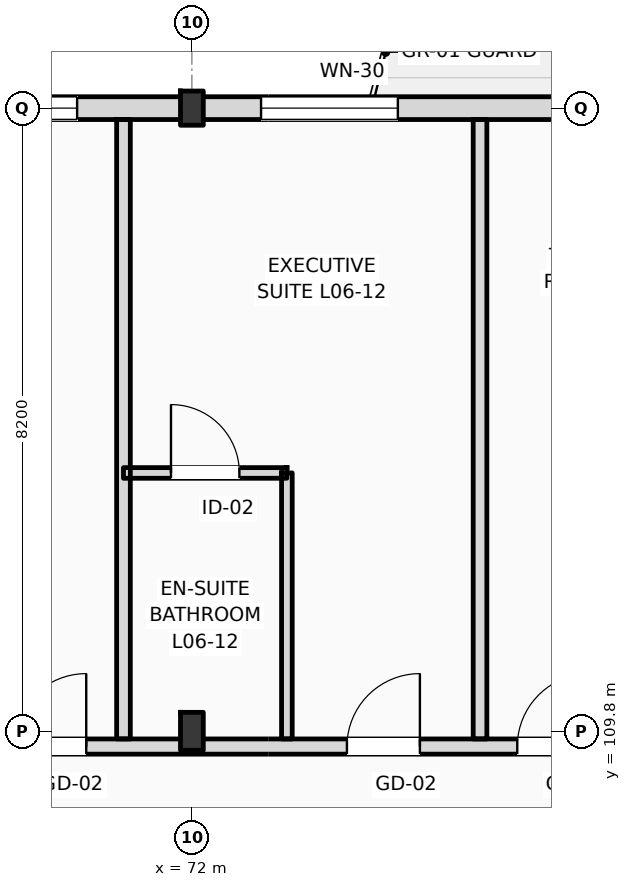
"""IFC4 building model, lengths in metres.
Left out: names, types, materials, properties, quantities, classifications, styles, units other than length and angle.
Written with IfcOpenShell. Run it as: python <this file> out.ifc"""

import sys

from ifc_helpers import new_model, si_unit, direction, frame, frame_2d, origin, origin_2d, place, context, subcontext, project, spatial, rectangle, i_section, extrude, element, fill, save


model = new_model("IFC4")
c1 = context("Model", 3, precision=1e-05, world=origin(), true_north=direction((0.0, 1.0)))
c2 = subcontext(c1, "Body", "Model", "MODEL_VIEW")
j1 = project(units=[si_unit("LENGTHUNIT", "METRE"), si_unit("PLANEANGLEUNIT", "RADIAN")], contexts=[c1])
p1 = place(None, origin())
s1 = spatial("IfcSite", under=j1, at=p1, CompositionType="ELEMENT")
p2 = place(p1, origin())
s2 = spatial("IfcBuilding", under=s1, at=p2, CompositionType="ELEMENT")
p3 = place(p2, frame((0.0, 0.0, 28.2)))
s3 = spatial("IfcBuildingStorey", under=s2, at=p3, CompositionType="ELEMENT", Elevation=28.2)
p4 = place(p3, frame((72.0, 109.8, 0.0), z_axis=(0.0, 0.0, 1.0), x_axis=(1.0, 0.0, 0.0)))
e1 = element("IfcColumn", 1, at=p4, inside=s3, PredefinedType="COLUMN", context=c2, shape_type="SweptSolid", body=[
    extrude(i_section(OverallWidth=0.3, OverallDepth=0.5, WebThickness=0.014, FlangeThickness=0.028, FilletRadius=0.027, at=origin_2d()), origin(), (0.0, 0.0, 1.0), 3.6),
])
p5 = place(p3, frame((72.0, 118.0, 0.0), z_axis=(0.0, 0.0, 1.0), x_axis=(1.0, 0.0, 0.0)))
e2 = element("IfcColumn", 2, at=p5, inside=s3, PredefinedType="COLUMN", context=c2, shape_type="SweptSolid", body=[
    extrude(i_section(OverallWidth=0.3, OverallDepth=0.45, WebThickness=0.014, FlangeThickness=0.026, FilletRadius=0.027, at=origin_2d()), origin(), (0.0, 0.0, 1.0), 3.6),
])
p6 = place(p3, frame((22.5, 118.0, 0.0), z_axis=(0.0, 0.0, 1.0), x_axis=(1.0, 0.0, 0.0)))
e3 = element("IfcWall", 3, at=p6, inside=s3, PredefinedType="STANDARD", context=c2, shape_type="SweptSolid", body=[
    extrude(rectangle(XDim=97.5, YDim=0.3, at=frame_2d((48.75, 0.0))), origin(), (0.0, 0.0, 1.0), 2.8),
])
p7 = place(p6, frame((0.91, 0.0, 0.9)))
e4 = element("IfcOpeningElement", 4, at=p7, cuts=e3, PredefinedType="OPENING", context=c2, shape_type="SweptSolid", body=[
    extrude(rectangle(XDim=0.9, YDim=1.72, at=frame_2d((0.45, 0.86))), frame((0.0, 0.16, 0.0), z_axis=(0.0, -1.0, 0.0), x_axis=(1.0, 0.0, 0.0)), (0.0, 0.0, 1.0), 0.32),
])
p8 = place(p6, frame((6.561, 0.0, 0.0)))
e5 = element("IfcOpeningElement", 5, at=p8, cuts=e3, PredefinedType="OPENING", context=c2, shape_type="SweptSolid", body=[
    extrude(rectangle(XDim=1.2, YDim=2.25, at=frame_2d((0.6, 1.125))), frame((0.0, 0.16, 0.0), z_axis=(0.0, -1.0, 0.0), x_axis=(1.0, 0.0, 0.0)), (0.0, 0.0, 1.0), 0.32),
])
p9 = place(p6, frame((11.477, 0.0, 0.9)))
e6 = element("IfcOpeningElement", 6, at=p9, cuts=e3, PredefinedType="OPENING", context=c2, shape_type="SweptSolid", body=[
    extrude(rectangle(XDim=1.1, YDim=1.5, at=frame_2d((0.55, 0.75))), frame((0.0, 0.16, 0.0), z_axis=(0.0, -1.0, 0.0), x_axis=(1.0, 0.0, 0.0)), (0.0, 0.0, 1.0), 0.32),
])
p10 = place(p6, frame((15.194, 0.0, 0.9)))
e7 = element("IfcOpeningElement", 7, at=p10, cuts=e3, PredefinedType="OPENING", context=c2, shape_type="SweptSolid", body=[
    extrude(rectangle(XDim=1.25, YDim=1.6, at=frame_2d((0.625, 0.8))), frame((0.0, 0.16, 0.0), z_axis=(0.0, -1.0, 0.0), x_axis=(1.0, 0.0, 0.0)), (0.0, 0.0, 1.0), 0.32),
])
p11 = place(p6, frame((19.509, 0.0, 0.9)))
e8 = element("IfcOpeningElement", 8, at=p11, cuts=e3, PredefinedType="OPENING", context=c2, shape_type="SweptSolid", body=[
    extrude(rectangle(XDim=1.4, YDim=1.7, at=frame_2d((0.7, 0.85))), frame((0.0, 0.16, 0.0), z_axis=(0.0, -1.0, 0.0), x_axis=(1.0, 0.0, 0.0)), (0.0, 0.0, 1.0), 0.32),
])
p12 = place(p6, frame((23.258, 0.0, 0.0)))
e9 = element("IfcOpeningElement", 9, at=p12, cuts=e3, PredefinedType="OPENING", context=c2, shape_type="SweptSolid", body=[
    extrude(rectangle(XDim=1.2, YDim=2.25, at=frame_2d((0.6, 1.125))), frame((0.0, 0.16, 0.0), z_axis=(0.0, -1.0, 0.0), x_axis=(1.0, 0.0, 0.0)), (0.0, 0.0, 1.0), 0.32),
])
p13 = place(p6, frame((28.115, 0.0, 0.9)))
e10 = element("IfcOpeningElement", 10, at=p13, cuts=e3, PredefinedType="OPENING", context=c2, shape_type="SweptSolid", body=[
    extrude(rectangle(XDim=1.75, YDim=1.72, at=frame_2d((0.875, 0.86))), frame((0.0, 0.16, 0.0), z_axis=(0.0, -1.0, 0.0), x_axis=(1.0, 0.0, 0.0)), (0.0, 0.0, 1.0), 0.32),
])
p14 = place(p6, frame((31.582, 0.0, 0.9)))
e11 = element("IfcOpeningElement", 11, at=p14, cuts=e3, PredefinedType="OPENING", context=c2, shape_type="SweptSolid", body=[
    extrude(rectangle(XDim=1.35, YDim=1.72, at=frame_2d((0.675, 0.86))), frame((0.0, 0.16, 0.0), z_axis=(0.0, -1.0, 0.0), x_axis=(1.0, 0.0, 0.0)), (0.0, 0.0, 1.0), 0.32),
])
p15 = place(p6, frame((37.379, 0.0, 0.0)))
e12 = element("IfcOpeningElement", 12, at=p15, cuts=e3, PredefinedType="OPENING", context=c2, shape_type="SweptSolid", body=[
    extrude(rectangle(XDim=1.2, YDim=2.25, at=frame_2d((0.6, 1.125))), frame((0.0, 0.16, 0.0), z_axis=(0.0, -1.0, 0.0), x_axis=(1.0, 0.0, 0.0)), (0.0, 0.0, 1.0), 0.32),
])
p16 = place(p6, frame((42.663, 0.0, 0.9)))
e13 = element("IfcOpeningElement", 13, at=p16, cuts=e3, PredefinedType="OPENING", context=c2, shape_type="SweptSolid", body=[
    extrude(rectangle(XDim=1.35, YDim=1.72, at=frame_2d((0.675, 0.86))), frame((0.0, 0.16, 0.0), z_axis=(0.0, -1.0, 0.0), x_axis=(1.0, 0.0, 0.0)), (0.0, 0.0, 1.0), 0.32),
])
p17 = place(p6, frame((45.119, 0.0, 0.9)))
e14 = element("IfcOpeningElement", 14, at=p17, cuts=e3, PredefinedType="OPENING", context=c2, shape_type="SweptSolid", body=[
    extrude(rectangle(XDim=2.871, YDim=1.72, at=frame_2d((1.436, 0.86))), frame((0.0, 0.16, 0.0), z_axis=(0.0, -1.0, 0.0), x_axis=(1.0, 0.0, 0.0)), (0.0, 0.0, 1.0), 0.32),
])
p18 = place(p6, frame((50.41, 0.0, 0.9)))
e15 = element("IfcOpeningElement", 15, at=p18, cuts=e3, PredefinedType="OPENING", context=c2, shape_type="SweptSolid", body=[
    extrude(rectangle(XDim=1.8, YDim=1.72, at=frame_2d((0.9, 0.86))), frame((0.0, 0.16, 0.0), z_axis=(0.0, -1.0, 0.0), x_axis=(1.0, 0.0, 0.0)), (0.0, 0.0, 1.0), 0.32),
])
p19 = place(p6, frame((54.375, 0.0, 0.0)))
e16 = element("IfcOpeningElement", 16, at=p19, cuts=e3, PredefinedType="OPENING", context=c2, shape_type="SweptSolid", body=[
    extrude(rectangle(XDim=1.2, YDim=2.25, at=frame_2d((0.6, 1.125))), frame((0.0, 0.16, 0.0), z_axis=(0.0, -1.0, 0.0), x_axis=(1.0, 0.0, 0.0)), (0.0, 0.0, 1.0), 0.32),
])
p20 = place(p6, frame((59.052, 0.0, 0.9)))
e17 = element("IfcOpeningElement", 17, at=p20, cuts=e3, PredefinedType="OPENING", context=c2, shape_type="SweptSolid", body=[
    extrude(rectangle(XDim=1.35, YDim=1.72, at=frame_2d((0.675, 0.86))), frame((0.0, 0.16, 0.0), z_axis=(0.0, -1.0, 0.0), x_axis=(1.0, 0.0, 0.0)), (0.0, 0.0, 1.0), 0.32),
])
p21 = place(p6, frame((62.768, 0.0, 0.9)))
e18 = element("IfcOpeningElement", 18, at=p21, cuts=e3, PredefinedType="OPENING", context=c2, shape_type="SweptSolid", body=[
    extrude(rectangle(XDim=1.5, YDim=1.72, at=frame_2d((0.75, 0.86))), frame((0.0, 0.16, 0.0), z_axis=(0.0, -1.0, 0.0), x_axis=(1.0, 0.0, 0.0)), (0.0, 0.0, 1.0), 0.32),
])
p22 = place(p6, frame((68.498, 0.0, 0.0)))
e19 = element("IfcOpeningElement", 19, at=p22, cuts=e3, PredefinedType="OPENING", context=c2, shape_type="SweptSolid", body=[
    extrude(rectangle(XDim=1.2, YDim=2.25, at=frame_2d((0.6, 1.125))), frame((0.0, 0.16, 0.0), z_axis=(0.0, -1.0, 0.0), x_axis=(1.0, 0.0, 0.0)), (0.0, 0.0, 1.0), 0.32),
])
p23 = place(p6, frame((71.265, 0.0, 0.9)))
e20 = element("IfcOpeningElement", 20, at=p23, cuts=e3, PredefinedType="OPENING", context=c2, shape_type="SweptSolid", body=[
    extrude(rectangle(XDim=0.9, YDim=1.72, at=frame_2d((0.45, 0.86))), frame((0.0, 0.16, 0.0), z_axis=(0.0, -1.0, 0.0), x_axis=(1.0, 0.0, 0.0)), (0.0, 0.0, 1.0), 0.32),
])
p24 = place(p6, frame((76.316, 0.0, 0.9)))
e21 = element("IfcOpeningElement", 21, at=p24, cuts=e3, PredefinedType="OPENING", context=c2, shape_type="SweptSolid", body=[
    extrude(rectangle(XDim=1.95, YDim=1.72, at=frame_2d((0.975, 0.86))), frame((0.0, 0.16, 0.0), z_axis=(0.0, -1.0, 0.0), x_axis=(1.0, 0.0, 0.0)), (0.0, 0.0, 1.0), 0.32),
])
p25 = place(p6, frame((81.632, 0.0, 0.9)))
e22 = element("IfcOpeningElement", 22, at=p25, cuts=e3, PredefinedType="OPENING", context=c2, shape_type="SweptSolid", body=[
    extrude(rectangle(XDim=1.35, YDim=1.72, at=frame_2d((0.675, 0.86))), frame((0.0, 0.16, 0.0), z_axis=(0.0, -1.0, 0.0), x_axis=(1.0, 0.0, 0.0)), (0.0, 0.0, 1.0), 0.32),
])
p26 = place(p6, frame((84.948, 0.0, 0.9)))
e23 = element("IfcOpeningElement", 23, at=p26, cuts=e3, PredefinedType="OPENING", context=c2, shape_type="SweptSolid", body=[
    extrude(rectangle(XDim=2.25, YDim=1.72, at=frame_2d((1.125, 0.86))), frame((0.0, 0.16, 0.0), z_axis=(0.0, -1.0, 0.0), x_axis=(1.0, 0.0, 0.0)), (0.0, 0.0, 1.0), 0.32),
])
p27 = place(p6, frame((90.063, 0.0, 0.9)))
e24 = element("IfcOpeningElement", 24, at=p27, cuts=e3, PredefinedType="OPENING", context=c2, shape_type="SweptSolid", body=[
    extrude(rectangle(XDim=1.8, YDim=1.72, at=frame_2d((0.9, 0.86))), frame((0.0, 0.16, 0.0), z_axis=(0.0, -1.0, 0.0), x_axis=(1.0, 0.0, 0.0)), (0.0, 0.0, 1.0), 0.32),
])
p28 = place(p6, frame((93.529, 0.0, 0.9)))
e25 = element("IfcOpeningElement", 25, at=p28, cuts=e3, PredefinedType="OPENING", context=c2, shape_type="SweptSolid", body=[
    extrude(rectangle(XDim=2.55, YDim=1.72, at=frame_2d((1.275, 0.86))), frame((0.0, 0.16, 0.0), z_axis=(0.0, -1.0, 0.0), x_axis=(1.0, 0.0, 0.0)), (0.0, 0.0, 1.0), 0.32),
])
p29 = place(p3, frame((10.65, 109.6, 0.0), z_axis=(0.0, 0.0, 1.0), x_axis=(1.0, 0.0, 0.0)))
e26 = element("IfcWall", 26, at=p29, inside=s3, PredefinedType="PARTITIONING", context=c2, shape_type="SweptSolid", body=[
    extrude(rectangle(XDim=109.21, YDim=0.2, at=frame_2d((54.605, 0.0))), origin(), (0.0, 0.0, 1.0), 2.8),
])
p30 = place(p29, frame((12.611, 0.0, 0.0)))
e27 = element("IfcOpeningElement", 27, at=p30, cuts=e26, PredefinedType="OPENING", context=c2, shape_type="SweptSolid", body=[
    extrude(rectangle(XDim=1.02, YDim=2.2, at=frame_2d((0.51, 1.1))), frame((0.0, 0.11, 0.0), z_axis=(0.0, -1.0, 0.0), x_axis=(1.0, 0.0, 0.0)), (0.0, 0.0, 1.0), 0.22),
])
p31 = place(p29, frame((19.451, 0.0, 0.0)))
e28 = element("IfcOpeningElement", 28, at=p31, cuts=e26, PredefinedType="OPENING", context=c2, shape_type="SweptSolid", body=[
    extrude(rectangle(XDim=1.02, YDim=2.2, at=frame_2d((0.51, 1.1))), frame((0.0, 0.11, 0.0), z_axis=(0.0, -1.0, 0.0), x_axis=(1.0, 0.0, 0.0)), (0.0, 0.0, 1.0), 0.22),
])
p32 = place(p29, frame((23.842, 0.0, 0.0)))
e29 = element("IfcOpeningElement", 29, at=p32, cuts=e26, PredefinedType="OPENING", context=c2, shape_type="SweptSolid", body=[
    extrude(rectangle(XDim=1.02, YDim=2.2, at=frame_2d((0.51, 1.1))), frame((0.0, 0.11, 0.0), z_axis=(0.0, -1.0, 0.0), x_axis=(1.0, 0.0, 0.0)), (0.0, 0.0, 1.0), 0.22),
])
p33 = place(p29, frame((26.084, 0.0, 0.0)))
e30 = element("IfcOpeningElement", 30, at=p33, cuts=e26, PredefinedType="OPENING", context=c2, shape_type="SweptSolid", body=[
    extrude(rectangle(XDim=1.02, YDim=2.2, at=frame_2d((0.51, 1.1))), frame((0.0, 0.11, 0.0), z_axis=(0.0, -1.0, 0.0), x_axis=(1.0, 0.0, 0.0)), (0.0, 0.0, 1.0), 0.22),
])
p34 = place(p29, frame((32.655, 0.0, 0.0)))
e31 = element("IfcOpeningElement", 31, at=p34, cuts=e26, PredefinedType="OPENING", context=c2, shape_type="SweptSolid", body=[
    extrude(rectangle(XDim=0.96, YDim=2.2, at=frame_2d((0.48, 1.1))), frame((0.0, 0.11, 0.0), z_axis=(0.0, -1.0, 0.0), x_axis=(1.0, 0.0, 0.0)), (0.0, 0.0, 1.0), 0.22),
])
p35 = place(p29, frame((34.895, 0.0, 0.0)))
e32 = element("IfcOpeningElement", 32, at=p35, cuts=e26, PredefinedType="OPENING", context=c2, shape_type="SweptSolid", body=[
    extrude(rectangle(XDim=0.96, YDim=2.2, at=frame_2d((0.48, 1.1))), frame((0.0, 0.11, 0.0), z_axis=(0.0, -1.0, 0.0), x_axis=(1.0, 0.0, 0.0)), (0.0, 0.0, 1.0), 0.22),
])
p36 = place(p29, frame((41.436, 0.0, 0.0)))
e33 = element("IfcOpeningElement", 33, at=p36, cuts=e26, PredefinedType="OPENING", context=c2, shape_type="SweptSolid", body=[
    extrude(rectangle(XDim=0.96, YDim=2.2, at=frame_2d((0.48, 1.1))), frame((0.0, 0.11, 0.0), z_axis=(0.0, -1.0, 0.0), x_axis=(1.0, 0.0, 0.0)), (0.0, 0.0, 1.0), 0.22),
])
p37 = place(p29, frame((43.427, 0.0, 0.0)))
e34 = element("IfcOpeningElement", 34, at=p37, cuts=e26, PredefinedType="OPENING", context=c2, shape_type="SweptSolid", body=[
    extrude(rectangle(XDim=0.96, YDim=2.2, at=frame_2d((0.48, 1.1))), frame((0.0, 0.11, 0.0), z_axis=(0.0, -1.0, 0.0), x_axis=(1.0, 0.0, 0.0)), (0.0, 0.0, 1.0), 0.22),
])
p38 = place(p29, frame((50.218, 0.0, 0.0)))
e35 = element("IfcOpeningElement", 35, at=p38, cuts=e26, PredefinedType="OPENING", context=c2, shape_type="SweptSolid", body=[
    extrude(rectangle(XDim=0.96, YDim=2.2, at=frame_2d((0.48, 1.1))), frame((0.0, 0.11, 0.0), z_axis=(0.0, -1.0, 0.0), x_axis=(1.0, 0.0, 0.0)), (0.0, 0.0, 1.0), 0.22),
])
p39 = place(p29, frame((54.859, 0.0, 0.0)))
e36 = element("IfcOpeningElement", 36, at=p39, cuts=e26, PredefinedType="OPENING", context=c2, shape_type="SweptSolid", body=[
    extrude(rectangle(XDim=0.96, YDim=2.2, at=frame_2d((0.48, 1.1))), frame((0.0, 0.11, 0.0), z_axis=(0.0, -1.0, 0.0), x_axis=(1.0, 0.0, 0.0)), (0.0, 0.0, 1.0), 0.22),
])
p40 = place(p29, frame((59.0, 0.0, 0.0)))
e37 = element("IfcOpeningElement", 37, at=p40, cuts=e26, PredefinedType="OPENING", context=c2, shape_type="SweptSolid", body=[
    extrude(rectangle(XDim=0.96, YDim=2.2, at=frame_2d((0.48, 1.1))), frame((0.0, 0.11, 0.0), z_axis=(0.0, -1.0, 0.0), x_axis=(1.0, 0.0, 0.0)), (0.0, 0.0, 1.0), 0.22),
])
p41 = place(p29, frame((63.39, 0.0, 0.0)))
e38 = element("IfcOpeningElement", 38, at=p41, cuts=e26, PredefinedType="OPENING", context=c2, shape_type="SweptSolid", body=[
    extrude(rectangle(XDim=0.96, YDim=2.2, at=frame_2d((0.48, 1.1))), frame((0.0, 0.11, 0.0), z_axis=(0.0, -1.0, 0.0), x_axis=(1.0, 0.0, 0.0)), (0.0, 0.0, 1.0), 0.22),
])
p42 = place(p29, frame((65.631, 0.0, 0.0)))
e39 = element("IfcOpeningElement", 39, at=p42, cuts=e26, PredefinedType="OPENING", context=c2, shape_type="SweptSolid", body=[
    extrude(rectangle(XDim=0.96, YDim=2.2, at=frame_2d((0.48, 1.1))), frame((0.0, 0.11, 0.0), z_axis=(0.0, -1.0, 0.0), x_axis=(1.0, 0.0, 0.0)), (0.0, 0.0, 1.0), 0.22),
])
p43 = place(p29, frame((72.172, 0.0, 0.0)))
e40 = element("IfcOpeningElement", 40, at=p43, cuts=e26, PredefinedType="OPENING", context=c2, shape_type="SweptSolid", body=[
    extrude(rectangle(XDim=0.96, YDim=2.2, at=frame_2d((0.48, 1.1))), frame((0.0, 0.11, 0.0), z_axis=(0.0, -1.0, 0.0), x_axis=(1.0, 0.0, 0.0)), (0.0, 0.0, 1.0), 0.22),
])
p44 = place(p29, frame((74.413, 0.0, 0.0)))
e41 = element("IfcOpeningElement", 41, at=p44, cuts=e26, PredefinedType="OPENING", context=c2, shape_type="SweptSolid", body=[
    extrude(rectangle(XDim=0.96, YDim=2.2, at=frame_2d((0.48, 1.1))), frame((0.0, 0.11, 0.0), z_axis=(0.0, -1.0, 0.0), x_axis=(1.0, 0.0, 0.0)), (0.0, 0.0, 1.0), 0.22),
])
p45 = place(p29, frame((80.954, 0.0, 0.0)))
e42 = element("IfcOpeningElement", 42, at=p45, cuts=e26, PredefinedType="OPENING", context=c2, shape_type="SweptSolid", body=[
    extrude(rectangle(XDim=0.96, YDim=2.2, at=frame_2d((0.48, 1.1))), frame((0.0, 0.11, 0.0), z_axis=(0.0, -1.0, 0.0), x_axis=(1.0, 0.0, 0.0)), (0.0, 0.0, 1.0), 0.22),
])
p46 = place(p29, frame((83.195, 0.0, 0.0)))
e43 = element("IfcOpeningElement", 43, at=p46, cuts=e26, PredefinedType="OPENING", context=c2, shape_type="SweptSolid", body=[
    extrude(rectangle(XDim=0.96, YDim=2.2, at=frame_2d((0.48, 1.1))), frame((0.0, 0.11, 0.0), z_axis=(0.0, -1.0, 0.0), x_axis=(1.0, 0.0, 0.0)), (0.0, 0.0, 1.0), 0.22),
])
p47 = place(p29, frame((89.735, 0.0, 0.0)))
e44 = element("IfcOpeningElement", 44, at=p47, cuts=e26, PredefinedType="OPENING", context=c2, shape_type="SweptSolid", body=[
    extrude(rectangle(XDim=0.96, YDim=2.2, at=frame_2d((0.48, 1.1))), frame((0.0, 0.11, 0.0), z_axis=(0.0, -1.0, 0.0), x_axis=(1.0, 0.0, 0.0)), (0.0, 0.0, 1.0), 0.22),
])
p48 = place(p29, frame((94.126, 0.0, 0.0)))
e45 = element("IfcOpeningElement", 45, at=p48, cuts=e26, PredefinedType="OPENING", context=c2, shape_type="SweptSolid", body=[
    extrude(rectangle(XDim=0.96, YDim=2.2, at=frame_2d((0.48, 1.1))), frame((0.0, 0.11, 0.0), z_axis=(0.0, -1.0, 0.0), x_axis=(1.0, 0.0, 0.0)), (0.0, 0.0, 1.0), 0.22),
])
p49 = place(p29, frame((98.517, 0.0, 0.0)))
e46 = element("IfcOpeningElement", 46, at=p49, cuts=e26, PredefinedType="OPENING", context=c2, shape_type="SweptSolid", body=[
    extrude(rectangle(XDim=0.96, YDim=2.2, at=frame_2d((0.48, 1.1))), frame((0.0, 0.11, 0.0), z_axis=(0.0, -1.0, 0.0), x_axis=(1.0, 0.0, 0.0)), (0.0, 0.0, 1.0), 0.22),
])
p50 = place(p29, frame((102.908, 0.0, 0.0)))
e47 = element("IfcOpeningElement", 47, at=p50, cuts=e26, PredefinedType="OPENING", context=c2, shape_type="SweptSolid", body=[
    extrude(rectangle(XDim=0.96, YDim=2.2, at=frame_2d((0.48, 1.1))), frame((0.0, 0.11, 0.0), z_axis=(0.0, -1.0, 0.0), x_axis=(1.0, 0.0, 0.0)), (0.0, 0.0, 1.0), 0.22),
])
p51 = place(p29, frame((105.099, 0.0, 0.0)))
e48 = element("IfcOpeningElement", 48, at=p51, cuts=e26, PredefinedType="OPENING", context=c2, shape_type="SweptSolid", body=[
    extrude(rectangle(XDim=0.96, YDim=2.2, at=frame_2d((0.48, 1.1))), frame((0.0, 0.11, 0.0), z_axis=(0.0, -1.0, 0.0), x_axis=(1.0, 0.0, 0.0)), (0.0, 0.0, 1.0), 0.22),
])
p52 = place(p29, frame((2.716, 0.0, 0.0)))
e49 = element("IfcOpeningElement", 49, at=p52, cuts=e26, PredefinedType="OPENING", context=c2, shape_type="SweptSolid", body=[
    extrude(rectangle(XDim=1.35, YDim=2.25, at=frame_2d((0.675, 1.125))), frame((0.0, 0.11, 0.0), z_axis=(0.0, -1.0, 0.0), x_axis=(1.0, 0.0, 0.0)), (0.0, 0.0, 1.0), 0.22),
])
p53 = place(p29, frame((6.65, 0.0, 0.0)))
e50 = element("IfcOpeningElement", 50, at=p53, cuts=e26, PredefinedType="OPENING", context=c2, shape_type="SweptSolid", body=[
    extrude(rectangle(XDim=1.35, YDim=2.25, at=frame_2d((0.675, 1.125))), frame((0.0, 0.11, 0.0), z_axis=(0.0, -1.0, 0.0), x_axis=(1.0, 0.0, 0.0)), (0.0, 0.0, 1.0), 0.22),
])
p54 = place(p29, frame((10.583, 0.0, 0.0)))
e51 = element("IfcOpeningElement", 51, at=p54, cuts=e26, PredefinedType="OPENING", context=c2, shape_type="SweptSolid", body=[
    extrude(rectangle(XDim=1.35, YDim=2.25, at=frame_2d((0.675, 1.125))), frame((0.0, 0.11, 0.0), z_axis=(0.0, -1.0, 0.0), x_axis=(1.0, 0.0, 0.0)), (0.0, 0.0, 1.0), 0.22),
])
for number, where, z_axis, x_axis in (
    (52, (71.1, 109.7, 0.0), (0.0, 0.0, 1.0), (0.0, 1.0, 0.0)),
    (53, (75.791, 109.7, 0.0), (0.0, 0.0, 1.0), (0.0, 1.0, 0.0)),
):
    element("IfcWall", number, at=place(p3, frame(where, z_axis=z_axis, x_axis=x_axis)), inside=s3, PredefinedType="PARTITIONING", context=c2, shape_type="SweptSolid", body=[
        extrude(rectangle(XDim=8.15, YDim=0.18, at=frame_2d((4.075, 0.0))), origin(), (0.0, 0.0, 1.0), 3.36),
    ])
p55 = place(p3, frame((73.25, 109.7, 0.0), z_axis=(0.0, 0.0, 1.0), x_axis=(0.0, 1.0, 0.0)))
e54 = element("IfcWall", 54, at=p55, inside=s3, PredefinedType="PARTITIONING", context=c2, shape_type="SweptSolid", body=[
    extrude(rectangle(XDim=3.5, YDim=0.14, at=frame_2d((1.75, 0.0))), origin(), (0.0, 0.0, 1.0), 3.36),
])
p56 = place(p3, frame((71.1, 113.2, 0.0), z_axis=(0.0, 0.0, 1.0), x_axis=(1.0, 0.0, 0.0)))
e55 = element("IfcWall", 55, at=p56, inside=s3, PredefinedType="PARTITIONING", context=c2, shape_type="SweptSolid", body=[
    extrude(rectangle(XDim=2.15, YDim=0.14, at=frame_2d((1.075, 0.0))), origin(), (0.0, 0.0, 1.0), 3.36),
])
p57 = place(p56, frame((0.625, 0.0, 0.0)))
e56 = element("IfcOpeningElement", 56, at=p57, cuts=e55, PredefinedType="OPENING", context=c2, shape_type="SweptSolid", body=[
    extrude(rectangle(XDim=0.9, YDim=2.1, at=frame_2d((0.45, 1.05))), frame((0.0, 0.08, 0.0), z_axis=(0.0, -1.0, 0.0), x_axis=(1.0, 0.0, 0.0)), (0.0, 0.0, 1.0), 0.16),
])
p58 = place(p17, origin())
e57 = element("IfcWindow", 57, at=p58, inside=s3, PartitioningType="DOUBLE_PANEL_VERTICAL", PredefinedType="WINDOW", context=c2, shape_type="SweptSolid", body=[
    extrude(rectangle(XDim=2.871, YDim=1.72, at=frame_2d((1.436, 0.86))), frame((0.0, 0.03, 0.0), z_axis=(0.0, -1.0, 0.0), x_axis=(1.0, 0.0, 0.0)), (0.0, 0.0, 1.0), 0.06),
])
fill(e14, e57)
p59 = place(p18, origin())
e58 = element("IfcWindow", 58, at=p59, inside=s3, PartitioningType="DOUBLE_PANEL_VERTICAL", PredefinedType="WINDOW", context=c2, shape_type="SweptSolid", body=[
    extrude(rectangle(XDim=1.8, YDim=1.72, at=frame_2d((0.9, 0.86))), frame((0.0, 0.03, 0.0), z_axis=(0.0, -1.0, 0.0), x_axis=(1.0, 0.0, 0.0)), (0.0, 0.0, 1.0), 0.06),
])
fill(e15, e58)
p60 = place(p40, origin())
e59 = element("IfcDoor", 59, at=p60, inside=s3, OperationType="SINGLE_SWING_RIGHT", PredefinedType="DOOR", context=c2, shape_type="SweptSolid", body=[
    extrude(rectangle(XDim=0.96, YDim=2.2, at=frame_2d((0.48, 1.1))), frame((0.0, 0.025, 0.0), z_axis=(0.0, -1.0, 0.0), x_axis=(1.0, 0.0, 0.0)), (0.0, 0.0, 1.0), 0.05),
])
fill(e37, e59)
p61 = place(p41, origin())
e60 = element("IfcDoor", 60, at=p61, inside=s3, OperationType="SINGLE_SWING_RIGHT", PredefinedType="DOOR", context=c2, shape_type="SweptSolid", body=[
    extrude(rectangle(XDim=0.96, YDim=2.2, at=frame_2d((0.48, 1.1))), frame((0.0, 0.025, 0.0), z_axis=(0.0, -1.0, 0.0), x_axis=(1.0, 0.0, 0.0)), (0.0, 0.0, 1.0), 0.05),
])
fill(e38, e60)
p62 = place(p57, origin())
e61 = element("IfcDoor", 61, at=p62, inside=s3, OperationType="SINGLE_SWING_LEFT", PredefinedType="DOOR", context=c2, shape_type="SweptSolid", body=[
    extrude(rectangle(XDim=0.9, YDim=2.1, at=frame_2d((0.45, 1.05))), frame((0.0, 0.025, 0.0), z_axis=(0.0, -1.0, 0.0), x_axis=(1.0, 0.0, 0.0)), (0.0, 0.0, 1.0), 0.05),
])
fill(e56, e61)
p63 = place(p42, origin())
e62 = element("IfcDoor", 62, at=p63, inside=s3, OperationType="SINGLE_SWING_RIGHT", PredefinedType="DOOR", context=c2, shape_type="SweptSolid", body=[
    extrude(rectangle(XDim=0.96, YDim=2.2, at=frame_2d((0.48, 1.1))), frame((0.0, 0.025, 0.0), z_axis=(0.0, -1.0, 0.0), x_axis=(1.0, 0.0, 0.0)), (0.0, 0.0, 1.0), 0.05),
])
fill(e39, e62)
save(model, sys.argv[1])
